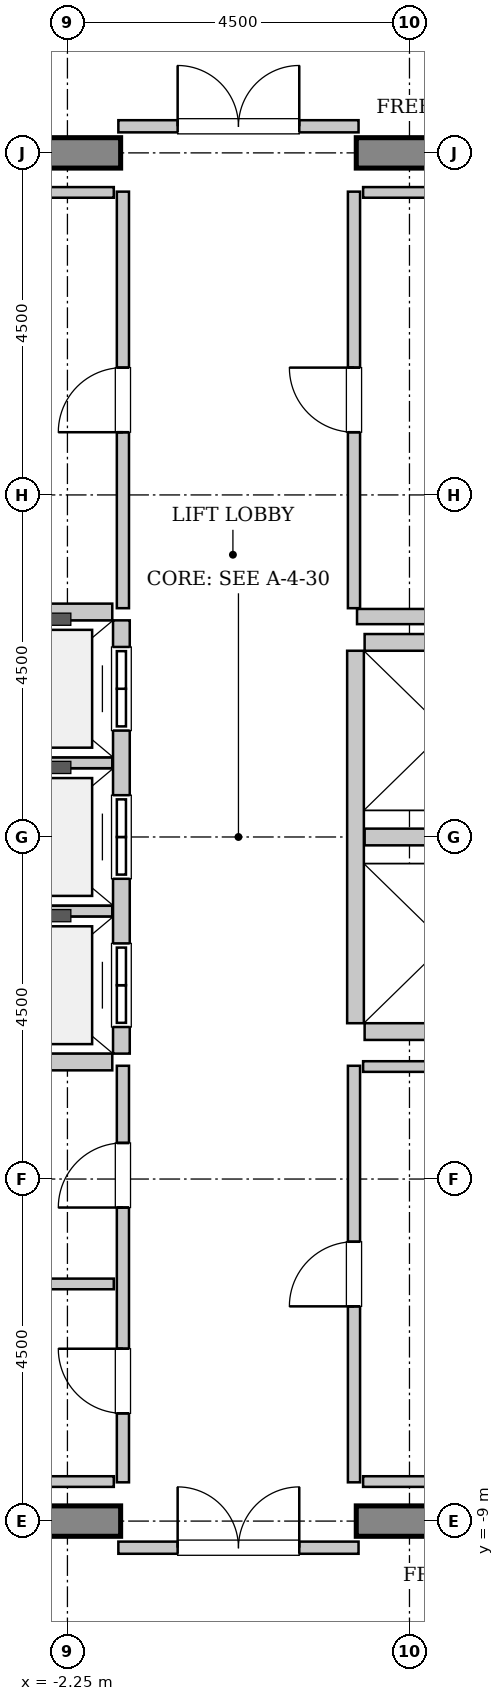
"""IFC4 building model, lengths in metres.
Left out: names, types, materials, properties, quantities, classifications, styles, units other than length and angle.
Written with IfcOpenShell. Run it as: python <this file> out.ifc"""

import sys

from ifc_helpers import new_model, si_unit, direction, frame, frame_2d, origin, place, context, subcontext, project, spatial, rectangle, extrude, source, transform, mapped, element, fill, save


model = new_model("IFC4")
c1 = context("Model", 3, precision=1e-05, world=origin(), true_north=direction((0.0, 1.0)))
c2 = subcontext(c1, "Body", "Model", "MODEL_VIEW")
j1 = project(units=[si_unit("LENGTHUNIT", "METRE"), si_unit("PLANEANGLEUNIT", "RADIAN")], contexts=[c1])
p1 = place(None, origin())
s1 = spatial("IfcSite", under=j1, at=p1, CompositionType="ELEMENT")
p2 = place(p1, origin())
s2 = spatial("IfcBuilding", under=s1, at=p2, CompositionType="ELEMENT")
p3 = place(p2, frame((0.0, 0.0, 337.6)))
s3 = spatial("IfcBuildingStorey", under=s2, at=p3, CompositionType="ELEMENT", Elevation=337.6)
m1 = source(origin(), c2, "Body", "SweptSolid", [
    extrude(rectangle(XDim=9.9, YDim=0.4, at=frame_2d((4.95, 0.0))), origin(), (0.0, 0.0, 1.0), 3.8),
])
for number, where, z_axis, x_axis in (
    (1, (-11.45, 9.0, 0.0), (0.0, 0.0, 1.0), (1.0, 0.0, 0.0)),
    (2, (1.55, 9.0, 0.0), (0.0, 0.0, 1.0), (1.0, 0.0, 0.0)),
    (3, (-11.45, -9.0, 0.0), (0.0, 0.0, 1.0), (1.0, 0.0, 0.0)),
    (4, (1.55, -9.0, 0.0), (0.0, 0.0, 1.0), (1.0, 0.0, 0.0)),
):
    element("IfcWall", number, at=place(p3, frame(where, z_axis=z_axis, x_axis=x_axis)), inside=s3, PredefinedType="SHEAR", context=c2, shape_type="MappedRepresentation", body=[
        mapped(m1, transform((0.0, 0.0, 0.0), x_axis=(1.0, 0.0, 0.0), y_axis=(0.0, 1.0, 0.0), z_axis=(0.0, 0.0, 1.0), scale=1.0)),
    ])
m2 = source(origin(), c2, "Body", "SweptSolid", [
    extrude(rectangle(XDim=5.7, YDim=0.22, at=frame_2d((2.85, 0.0))), origin(), (0.0, 0.0, 1.0), 3.535),
])
p4 = place(p3, frame((-1.54, -2.85, 0.0), z_axis=(0.0, 0.0, 1.0), x_axis=(0.0, 1.0, 0.0)))
e5 = element("IfcWall", 5, at=p4, inside=s3, PredefinedType="SOLIDWALL", context=c2, shape_type="MappedRepresentation", body=[
    mapped(m2, transform((0.0, 0.0, 0.0), x_axis=(1.0, 0.0, 0.0), y_axis=(0.0, 1.0, 0.0), z_axis=(0.0, 0.0, 1.0), scale=1.0)),
])
p5 = place(p4, frame((0.35, 0.0, 0.0)))
e6 = element("IfcOpeningElement", 6, at=p5, cuts=e5, PredefinedType="OPENING", context=c2, shape_type="SweptSolid", body=[
    extrude(rectangle(XDim=1.1, YDim=2.2, at=frame_2d((0.55, 1.1))), frame((0.0, 0.12, 0.0), z_axis=(0.0, -1.0, 0.0), x_axis=(1.0, 0.0, 0.0)), (0.0, 0.0, 1.0), 0.24),
])
p6 = place(p4, frame((2.3, 0.0, 0.0)))
e7 = element("IfcOpeningElement", 7, at=p6, cuts=e5, PredefinedType="OPENING", context=c2, shape_type="SweptSolid", body=[
    extrude(rectangle(XDim=1.1, YDim=2.2, at=frame_2d((0.55, 1.1))), frame((0.0, 0.12, 0.0), z_axis=(0.0, -1.0, 0.0), x_axis=(1.0, 0.0, 0.0)), (0.0, 0.0, 1.0), 0.24),
])
p7 = place(p4, frame((4.25, 0.0, 0.0)))
e8 = element("IfcOpeningElement", 8, at=p7, cuts=e5, PredefinedType="OPENING", context=c2, shape_type="SweptSolid", body=[
    extrude(rectangle(XDim=1.1, YDim=2.2, at=frame_2d((0.55, 1.1))), frame((0.0, 0.12, 0.0), z_axis=(0.0, -1.0, 0.0), x_axis=(1.0, 0.0, 0.0)), (0.0, 0.0, 1.0), 0.24),
])
m3 = source(origin(), c2, "Body", "SweptSolid", [
    extrude(rectangle(XDim=2.13, YDim=0.22, at=frame_2d((1.065, 0.0))), origin(), (0.0, 0.0, 1.0), 3.535),
])
p8 = place(p3, frame((-3.79, -2.96, 0.0), z_axis=(0.0, 0.0, 1.0), x_axis=(1.0, 0.0, 0.0)))
e9 = element("IfcWall", 9, at=p8, inside=s3, PredefinedType="SOLIDWALL", context=c2, shape_type="MappedRepresentation", body=[
    mapped(m3, transform((0.0, 0.0, 0.0), x_axis=(1.0, 0.0, 0.0), y_axis=(0.0, 1.0, 0.0), z_axis=(0.0, 0.0, 1.0), scale=1.0)),
])
m4 = source(origin(), c2, "Body", "SweptSolid", [
    extrude(rectangle(XDim=2.13, YDim=0.14, at=frame_2d((1.065, 0.0))), origin(), (0.0, 0.0, 1.0), 3.535),
])
for number, where, z_axis, x_axis in (
    (10, (-3.79, -0.975, 0.0), (0.0, 0.0, 1.0), (1.0, 0.0, 0.0)),
    (11, (-3.79, 0.975, 0.0), (0.0, 0.0, 1.0), (1.0, 0.0, 0.0)),
):
    element("IfcWall", number, at=place(p3, frame(where, z_axis=z_axis, x_axis=x_axis)), inside=s3, PredefinedType="PARTITIONING", context=c2, shape_type="MappedRepresentation", body=[
        mapped(m4, transform((0.0, 0.0, 0.0), x_axis=(1.0, 0.0, 0.0), y_axis=(0.0, 1.0, 0.0), z_axis=(0.0, 0.0, 1.0), scale=1.0)),
    ])
p9 = place(p3, frame((-1.66, 2.96, 0.0), z_axis=(0.0, 0.0, 1.0), x_axis=(-1.0, 0.0, 0.0)))
e12 = element("IfcWall", 12, at=p9, inside=s3, PredefinedType="SOLIDWALL", context=c2, shape_type="MappedRepresentation", body=[
    mapped(m3, transform((0.0, 0.0, 0.0), x_axis=(1.0, 0.0, 0.0), y_axis=(0.0, 1.0, 0.0), z_axis=(0.0, 0.0, 1.0), scale=1.0)),
])
m5 = source(origin(), c2, "Body", "SweptSolid", [
    extrude(rectangle(XDim=4.9, YDim=0.22, at=frame_2d((2.45, 0.0))), origin(), (0.0, 0.0, 1.0), 3.535),
])
p10 = place(p3, frame((1.54, 2.45, 0.0), z_axis=(0.0, 0.0, 1.0), x_axis=(0.0, -1.0, 0.0)))
e13 = element("IfcWall", 13, at=p10, inside=s3, PredefinedType="SOLIDWALL", context=c2, shape_type="MappedRepresentation", body=[
    mapped(m5, transform((0.0, 0.0, 0.0), x_axis=(1.0, 0.0, 0.0), y_axis=(0.0, 1.0, 0.0), z_axis=(0.0, 0.0, 1.0), scale=1.0)),
])
for number, where, z_axis, x_axis in (
    (14, (1.66, -2.56, 0.0), (0.0, 0.0, 1.0), (1.0, 0.0, 0.0)),
    (15, (1.66, 0.0, 0.0), (0.0, 0.0, 1.0), (1.0, 0.0, 0.0)),
    (16, (3.79, 2.56, 0.0), (0.0, 0.0, 1.0), (-1.0, 0.0, 0.0)),
):
    element("IfcWall", number, at=place(p3, frame(where, z_axis=z_axis, x_axis=x_axis)), inside=s3, PredefinedType="SOLIDWALL", context=c2, shape_type="MappedRepresentation", body=[
        mapped(m3, transform((0.0, 0.0, 0.0), x_axis=(1.0, 0.0, 0.0), y_axis=(0.0, 1.0, 0.0), z_axis=(0.0, 0.0, 1.0), scale=1.0)),
    ])
m6 = source(origin(), c2, "Body", "SweptSolid", [
    extrude(rectangle(XDim=2.52, YDim=0.2, at=frame_2d((1.26, 0.0))), origin(), (0.0, 0.0, 1.0), 3.535),
])
p11 = place(p3, frame((1.56, 2.9, 0.0), z_axis=(0.0, 0.0, 1.0), x_axis=(1.0, 0.0, 0.0)))
e17 = element("IfcWall", 17, at=p11, inside=s3, PredefinedType="PARTITIONING", context=c2, shape_type="MappedRepresentation", body=[
    mapped(m6, transform((0.0, 0.0, 0.0), x_axis=(1.0, 0.0, 0.0), y_axis=(0.0, 1.0, 0.0), z_axis=(0.0, 0.0, 1.0), scale=1.0)),
])
m7 = source(origin(), c2, "Body", "SweptSolid", [
    extrude(rectangle(XDim=3.16, YDim=0.16, at=frame_2d((1.58, 0.0))), origin(), (0.0, 0.0, 1.0), 2.625),
])
p12 = place(p3, frame((-1.58, 9.35, 0.0), z_axis=(0.0, 0.0, 1.0), x_axis=(1.0, 0.0, 0.0)))
e18 = element("IfcWall", 18, at=p12, inside=s3, PredefinedType="PARTITIONING", context=c2, shape_type="MappedRepresentation", body=[
    mapped(m7, transform((0.0, 0.0, 0.0), x_axis=(1.0, 0.0, 0.0), y_axis=(0.0, 1.0, 0.0), z_axis=(0.0, 0.0, 1.0), scale=1.0)),
])
p13 = place(p12, frame((0.78, 0.0, 0.0)))
e19 = element("IfcOpeningElement", 19, at=p13, cuts=e18, PredefinedType="OPENING", context=c2, shape_type="SweptSolid", body=[
    extrude(rectangle(XDim=1.6, YDim=2.3, at=frame_2d((0.8, 1.15))), frame((0.0, 0.09, 0.0), z_axis=(0.0, -1.0, 0.0), x_axis=(1.0, 0.0, 0.0)), (0.0, 0.0, 1.0), 0.18),
])
p14 = place(p3, frame((-1.58, -9.35, 0.0), z_axis=(0.0, 0.0, 1.0), x_axis=(1.0, 0.0, 0.0)))
e20 = element("IfcWall", 20, at=p14, inside=s3, PredefinedType="PARTITIONING", context=c2, shape_type="MappedRepresentation", body=[
    mapped(m7, transform((0.0, 0.0, 0.0), x_axis=(1.0, 0.0, 0.0), y_axis=(0.0, 1.0, 0.0), z_axis=(0.0, 0.0, 1.0), scale=1.0)),
])
p15 = place(p14, frame((0.78, 0.0, 0.0)))
e21 = element("IfcOpeningElement", 21, at=p15, cuts=e20, PredefinedType="OPENING", context=c2, shape_type="SweptSolid", body=[
    extrude(rectangle(XDim=1.6, YDim=2.3, at=frame_2d((0.8, 1.15))), frame((0.0, 0.09, 0.0), z_axis=(0.0, -1.0, 0.0), x_axis=(1.0, 0.0, 0.0)), (0.0, 0.0, 1.0), 0.18),
])
m8 = source(origin(), c2, "Body", "SweptSolid", [
    extrude(rectangle(XDim=5.48, YDim=0.16, at=frame_2d((2.74, 0.0))), origin(), (0.0, 0.0, 1.0), 3.535),
])
p16 = place(p3, frame((-1.52, 3.01, 0.0), z_axis=(0.0, 0.0, 1.0), x_axis=(0.0, 1.0, 0.0)))
e22 = element("IfcWall", 22, at=p16, inside=s3, PredefinedType="PARTITIONING", context=c2, shape_type="MappedRepresentation", body=[
    mapped(m8, transform((0.0, 0.0, 0.0), x_axis=(1.0, 0.0, 0.0), y_axis=(0.0, 1.0, 0.0), z_axis=(0.0, 0.0, 1.0), scale=1.0)),
])
p17 = place(p16, frame((2.315, 0.0, 0.0)))
e23 = element("IfcOpeningElement", 23, at=p17, cuts=e22, PredefinedType="OPENING", context=c2, shape_type="SweptSolid", body=[
    extrude(rectangle(XDim=0.85, YDim=2.1, at=frame_2d((0.425, 1.05))), frame((0.0, 0.09, 0.0), z_axis=(0.0, -1.0, 0.0), x_axis=(1.0, 0.0, 0.0)), (0.0, 0.0, 1.0), 0.18),
])
m9 = source(origin(), c2, "Body", "SweptSolid", [
    extrude(rectangle(XDim=3.15, YDim=0.14, at=frame_2d((1.575, 0.0))), origin(), (0.0, 0.0, 1.0), 3.535),
])
p18 = place(p3, frame((-4.79, 8.48, 0.0), z_axis=(0.0, 0.0, 1.0), x_axis=(1.0, 0.0, 0.0)))
e24 = element("IfcWall", 24, at=p18, inside=s3, PredefinedType="PARTITIONING", context=c2, shape_type="MappedRepresentation", body=[
    mapped(m9, transform((0.0, 0.0, 0.0), x_axis=(1.0, 0.0, 0.0), y_axis=(0.0, 1.0, 0.0), z_axis=(0.0, 0.0, 1.0), scale=1.0)),
])
p19 = place(p3, frame((-1.52, -8.49, 0.0), z_axis=(0.0, 0.0, 1.0), x_axis=(0.0, 1.0, 0.0)))
e25 = element("IfcWall", 25, at=p19, inside=s3, PredefinedType="PARTITIONING", context=c2, shape_type="MappedRepresentation", body=[
    mapped(m8, transform((0.0, 0.0, 0.0), x_axis=(1.0, 0.0, 0.0), y_axis=(0.0, 1.0, 0.0), z_axis=(0.0, 0.0, 1.0), scale=1.0)),
])
p20 = place(p19, frame((0.907, 0.0, 0.0)))
e26 = element("IfcOpeningElement", 26, at=p20, cuts=e25, PredefinedType="OPENING", context=c2, shape_type="SweptSolid", body=[
    extrude(rectangle(XDim=0.85, YDim=2.1, at=frame_2d((0.425, 1.05))), frame((0.0, 0.09, 0.0), z_axis=(0.0, -1.0, 0.0), x_axis=(1.0, 0.0, 0.0)), (0.0, 0.0, 1.0), 0.18),
])
p21 = place(p19, frame((3.615, 0.0, 0.0)))
e27 = element("IfcOpeningElement", 27, at=p21, cuts=e25, PredefinedType="OPENING", context=c2, shape_type="SweptSolid", body=[
    extrude(rectangle(XDim=0.85, YDim=2.1, at=frame_2d((0.425, 1.05))), frame((0.0, 0.09, 0.0), z_axis=(0.0, -1.0, 0.0), x_axis=(1.0, 0.0, 0.0)), (0.0, 0.0, 1.0), 0.18),
])
m10 = source(origin(), c2, "Body", "SweptSolid", [
    extrude(rectangle(XDim=5.55, YDim=0.14, at=frame_2d((2.775, 0.0))), origin(), (0.0, 0.0, 1.0), 3.535),
])
p22 = place(p3, frame((-7.19, -5.88, 0.0), z_axis=(0.0, 0.0, 1.0), x_axis=(1.0, 0.0, 0.0)))
e28 = element("IfcWall", 28, at=p22, inside=s3, PredefinedType="PARTITIONING", context=c2, shape_type="MappedRepresentation", body=[
    mapped(m10, transform((0.0, 0.0, 0.0), x_axis=(1.0, 0.0, 0.0), y_axis=(0.0, 1.0, 0.0), z_axis=(0.0, 0.0, 1.0), scale=1.0)),
])
p23 = place(p3, frame((1.52, 3.01, 0.0), z_axis=(0.0, 0.0, 1.0), x_axis=(0.0, 1.0, 0.0)))
e29 = element("IfcWall", 29, at=p23, inside=s3, PredefinedType="PARTITIONING", context=c2, shape_type="MappedRepresentation", body=[
    mapped(m8, transform((0.0, 0.0, 0.0), x_axis=(1.0, 0.0, 0.0), y_axis=(0.0, 1.0, 0.0), z_axis=(0.0, 0.0, 1.0), scale=1.0)),
])
p24 = place(p23, frame((2.315, 0.0, 0.0)))
e30 = element("IfcOpeningElement", 30, at=p24, cuts=e29, PredefinedType="OPENING", context=c2, shape_type="SweptSolid", body=[
    extrude(rectangle(XDim=0.85, YDim=2.1, at=frame_2d((0.425, 1.05))), frame((0.0, 0.09, 0.0), z_axis=(0.0, -1.0, 0.0), x_axis=(1.0, 0.0, 0.0)), (0.0, 0.0, 1.0), 0.18),
])
for number, where, z_axis, x_axis in (
    (31, (1.64, 8.48, 0.0), (0.0, 0.0, 1.0), (1.0, 0.0, 0.0)),
    (32, (-4.79, -8.48, 0.0), (0.0, 0.0, 1.0), (1.0, 0.0, 0.0)),
):
    element("IfcWall", number, at=place(p3, frame(where, z_axis=z_axis, x_axis=x_axis)), inside=s3, PredefinedType="PARTITIONING", context=c2, shape_type="MappedRepresentation", body=[
        mapped(m9, transform((0.0, 0.0, 0.0), x_axis=(1.0, 0.0, 0.0), y_axis=(0.0, 1.0, 0.0), z_axis=(0.0, 0.0, 1.0), scale=1.0)),
    ])
p25 = place(p3, frame((1.52, -8.49, 0.0), z_axis=(0.0, 0.0, 1.0), x_axis=(0.0, 1.0, 0.0)))
e33 = element("IfcWall", 33, at=p25, inside=s3, PredefinedType="PARTITIONING", context=c2, shape_type="MappedRepresentation", body=[
    mapped(m8, transform((0.0, 0.0, 0.0), x_axis=(1.0, 0.0, 0.0), y_axis=(0.0, 1.0, 0.0), z_axis=(0.0, 0.0, 1.0), scale=1.0)),
])
p26 = place(p25, frame((2.315, 0.0, 0.0)))
e34 = element("IfcOpeningElement", 34, at=p26, cuts=e33, PredefinedType="OPENING", context=c2, shape_type="SweptSolid", body=[
    extrude(rectangle(XDim=0.85, YDim=2.1, at=frame_2d((0.425, 1.05))), frame((0.0, 0.09, 0.0), z_axis=(0.0, -1.0, 0.0), x_axis=(1.0, 0.0, 0.0)), (0.0, 0.0, 1.0), 0.18),
])
for number, where, z_axis, x_axis in (
    (35, (1.64, -3.02, 0.0), (0.0, 0.0, 1.0), (1.0, 0.0, 0.0)),
    (36, (1.64, -8.48, 0.0), (0.0, 0.0, 1.0), (1.0, 0.0, 0.0)),
):
    element("IfcWall", number, at=place(p3, frame(where, z_axis=z_axis, x_axis=x_axis)), inside=s3, PredefinedType="PARTITIONING", context=c2, shape_type="MappedRepresentation", body=[
        mapped(m9, transform((0.0, 0.0, 0.0), x_axis=(1.0, 0.0, 0.0), y_axis=(0.0, 1.0, 0.0), z_axis=(0.0, 0.0, 1.0), scale=1.0)),
    ])
m11 = source(origin(), c2, "Body", "SweptSolid", [
    extrude(rectangle(XDim=1.1, YDim=2.2, at=frame_2d((0.55, 1.1))), frame((0.0, 0.025, 0.0), z_axis=(0.0, -1.0, 0.0), x_axis=(1.0, 0.0, 0.0)), (0.0, 0.0, 1.0), 0.05),
])
p27 = place(p5, origin())
e37 = element("IfcDoor", 37, at=p27, inside=s3, OperationType="DOUBLE_DOOR_SLIDING", PredefinedType="DOOR", context=c2, shape_type="MappedRepresentation", body=[
    mapped(m11, transform((0.0, 0.0, 0.0), x_axis=(1.0, 0.0, 0.0), y_axis=(0.0, 1.0, 0.0), z_axis=(0.0, 0.0, 1.0), scale=1.0)),
])
fill(e6, e37)
p28 = place(p6, origin())
e38 = element("IfcDoor", 38, at=p28, inside=s3, OperationType="DOUBLE_DOOR_SLIDING", PredefinedType="DOOR", context=c2, shape_type="MappedRepresentation", body=[
    mapped(m11, transform((0.0, 0.0, 0.0), x_axis=(1.0, 0.0, 0.0), y_axis=(0.0, 1.0, 0.0), z_axis=(0.0, 0.0, 1.0), scale=1.0)),
])
fill(e7, e38)
p29 = place(p7, origin())
e39 = element("IfcDoor", 39, at=p29, inside=s3, OperationType="DOUBLE_DOOR_SLIDING", PredefinedType="DOOR", context=c2, shape_type="MappedRepresentation", body=[
    mapped(m11, transform((0.0, 0.0, 0.0), x_axis=(1.0, 0.0, 0.0), y_axis=(0.0, 1.0, 0.0), z_axis=(0.0, 0.0, 1.0), scale=1.0)),
])
fill(e8, e39)
m12 = source(origin(), c2, "Body", "SweptSolid", [
    extrude(rectangle(XDim=1.6, YDim=2.3, at=frame_2d((0.8, 1.15))), frame((0.0, 0.025, 0.0), z_axis=(0.0, -1.0, 0.0), x_axis=(1.0, 0.0, 0.0)), (0.0, 0.0, 1.0), 0.05),
])
p30 = place(p13, origin())
e40 = element("IfcDoor", 40, at=p30, inside=s3, OperationType="DOUBLE_DOOR_SINGLE_SWING", PredefinedType="DOOR", context=c2, shape_type="MappedRepresentation", body=[
    mapped(m12, transform((0.0, 0.0, 0.0), x_axis=(1.0, 0.0, 0.0), y_axis=(0.0, 1.0, 0.0), z_axis=(0.0, 0.0, 1.0), scale=1.0)),
])
fill(e19, e40)
p31 = place(p15, origin())
e41 = element("IfcDoor", 41, at=p31, inside=s3, OperationType="DOUBLE_DOOR_SINGLE_SWING", PredefinedType="DOOR", context=c2, shape_type="MappedRepresentation", body=[
    mapped(m12, transform((0.0, 0.0, 0.0), x_axis=(1.0, 0.0, 0.0), y_axis=(0.0, 1.0, 0.0), z_axis=(0.0, 0.0, 1.0), scale=1.0)),
])
fill(e21, e41)
m13 = source(origin(), c2, "Body", "SweptSolid", [
    extrude(rectangle(XDim=0.85, YDim=2.1, at=frame_2d((0.425, 1.05))), frame((0.0, 0.025, 0.0), z_axis=(0.0, -1.0, 0.0), x_axis=(1.0, 0.0, 0.0)), (0.0, 0.0, 1.0), 0.05),
])
p32 = place(p17, origin())
e42 = element("IfcDoor", 42, at=p32, inside=s3, OperationType="SINGLE_SWING_LEFT", PredefinedType="DOOR", context=c2, shape_type="MappedRepresentation", body=[
    mapped(m13, transform((0.0, 0.0, 0.0), x_axis=(1.0, 0.0, 0.0), y_axis=(0.0, 1.0, 0.0), z_axis=(0.0, 0.0, 1.0), scale=1.0)),
])
fill(e23, e42)
p33 = place(p20, origin())
e43 = element("IfcDoor", 43, at=p33, inside=s3, OperationType="SINGLE_SWING_RIGHT", PredefinedType="DOOR", context=c2, shape_type="MappedRepresentation", body=[
    mapped(m13, transform((0.0, 0.0, 0.0), x_axis=(1.0, 0.0, 0.0), y_axis=(0.0, 1.0, 0.0), z_axis=(0.0, 0.0, 1.0), scale=1.0)),
])
fill(e26, e43)
p34 = place(p21, origin())
e44 = element("IfcDoor", 44, at=p34, inside=s3, OperationType="SINGLE_SWING_LEFT", PredefinedType="DOOR", context=c2, shape_type="MappedRepresentation", body=[
    mapped(m13, transform((0.0, 0.0, 0.0), x_axis=(1.0, 0.0, 0.0), y_axis=(0.0, 1.0, 0.0), z_axis=(0.0, 0.0, 1.0), scale=1.0)),
])
fill(e27, e44)
p35 = place(p24, origin())
e45 = element("IfcDoor", 45, at=p35, inside=s3, OperationType="SINGLE_SWING_RIGHT", PredefinedType="DOOR", context=c2, shape_type="MappedRepresentation", body=[
    mapped(m13, transform((0.0, 0.0, 0.0), x_axis=(1.0, 0.0, 0.0), y_axis=(0.0, 1.0, 0.0), z_axis=(0.0, 0.0, 1.0), scale=1.0)),
])
fill(e30, e45)
p36 = place(p26, origin())
e46 = element("IfcDoor", 46, at=p36, inside=s3, OperationType="SINGLE_SWING_LEFT", PredefinedType="DOOR", context=c2, shape_type="MappedRepresentation", body=[
    mapped(m13, transform((0.0, 0.0, 0.0), x_axis=(1.0, 0.0, 0.0), y_axis=(0.0, 1.0, 0.0), z_axis=(0.0, 0.0, 1.0), scale=1.0)),
])
fill(e34, e46)
save(model, sys.argv[1])
